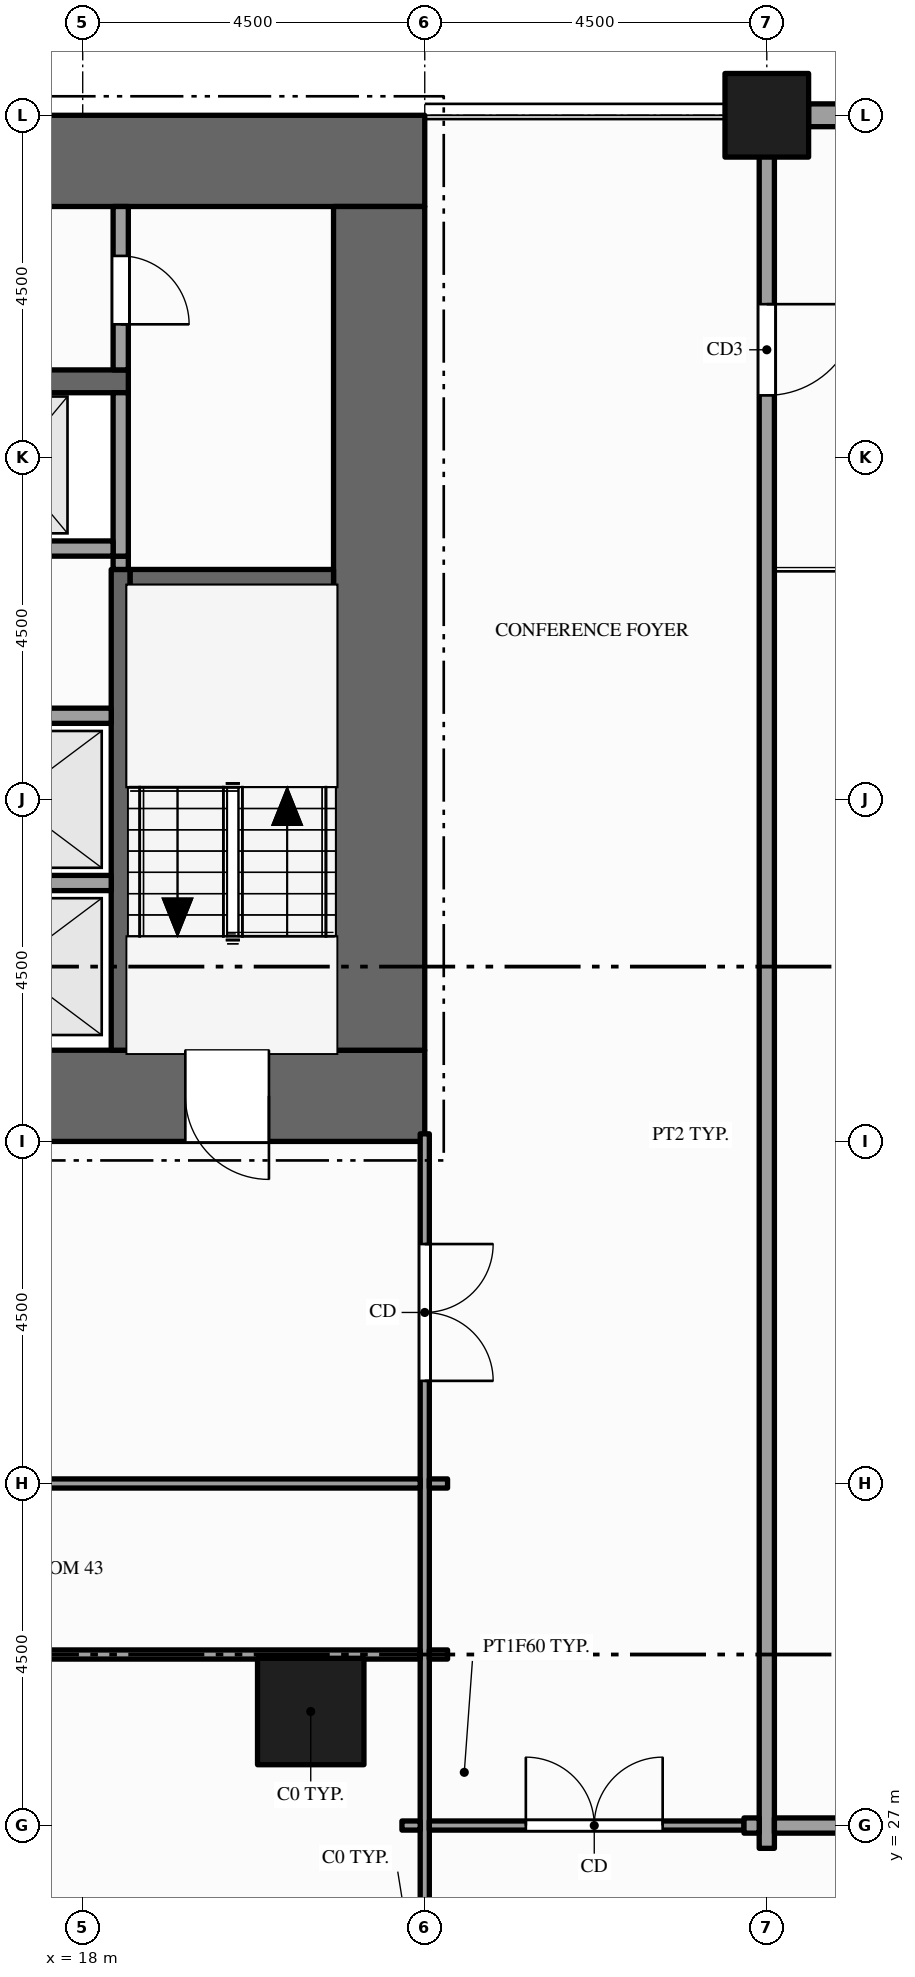
"""IFC4 building model, lengths in metres.
Left out: names, types, materials, properties, quantities, classifications, styles, units other than length and angle.
Written with IfcOpenShell. Run it as: python <this file> out.ifc"""

import sys

from ifc_helpers import new_model, si_unit, direction, frame, frame_2d, origin, origin_2d, place, context, subcontext, project, spatial, rectangle, hollow_rectangle, extrude, element, fill, save


model = new_model("IFC4")
c1 = context("Model", 3, precision=1e-05, world=origin(), true_north=direction((0.0, 1.0)))
c2 = subcontext(c1, "Body", "Model", "MODEL_VIEW")
j1 = project(units=[si_unit("LENGTHUNIT", "METRE"), si_unit("PLANEANGLEUNIT", "RADIAN")], contexts=[c1])
p1 = place(None, origin())
s1 = spatial("IfcSite", under=j1, at=p1, CompositionType="ELEMENT")
p2 = place(p1, origin())
s2 = spatial("IfcBuilding", under=s1, at=p2, CompositionType="ELEMENT")
p3 = place(p2, frame((0.0, 0.0, 14.0)))
s3 = spatial("IfcBuildingStorey", under=s2, at=p3, CompositionType="ELEMENT", Elevation=14.0)
p4 = place(p3, frame((0.0, 36.6, -0.15), z_axis=(0.0, 0.0, 1.0), x_axis=(1.0, 0.0, 0.0)))
e1 = element("IfcWall", 1, at=p4, inside=s3, PredefinedType="SHEAR", context=c2, shape_type="SweptSolid", body=[
    extrude(rectangle(XDim=22.5, YDim=1.2, at=frame_2d((11.25, 0.0))), origin(), (0.0, 0.0, 1.0), 5.0),
])
p5 = place(p4, frame((7.1, 0.0, 0.15)))
e2 = element("IfcOpeningElement", 2, at=p5, cuts=e1, PredefinedType="OPENING", context=c2, shape_type="SweptSolid", body=[
    extrude(rectangle(XDim=1.8, YDim=2.1, at=frame_2d((0.9, 1.05))), frame((0.0, 0.61, 0.0), z_axis=(0.0, -1.0, 0.0), x_axis=(1.0, 0.0, 0.0)), (0.0, 0.0, 1.0), 1.22),
])
p6 = place(p4, frame((13.15, 0.0, 0.15)))
e3 = element("IfcOpeningElement", 3, at=p6, cuts=e1, PredefinedType="OPENING", context=c2, shape_type="SweptSolid", body=[
    extrude(rectangle(XDim=1.1, YDim=2.1, at=frame_2d((0.55, 1.05))), frame((0.0, 0.61, 0.0), z_axis=(0.0, -1.0, 0.0), x_axis=(1.0, 0.0, 0.0)), (0.0, 0.0, 1.0), 1.22),
])
p7 = place(p4, frame((2.15, 0.0, 0.15)))
e4 = element("IfcOpeningElement", 4, at=p7, cuts=e1, PredefinedType="OPENING", context=c2, shape_type="SweptSolid", body=[
    extrude(rectangle(XDim=1.1, YDim=2.1, at=frame_2d((0.55, 1.05))), frame((0.0, 0.61, 0.0), z_axis=(0.0, -1.0, 0.0), x_axis=(1.0, 0.0, 0.0)), (0.0, 0.0, 1.0), 1.22),
])
p8 = place(p4, frame((19.35, 0.0, 0.15)))
e5 = element("IfcOpeningElement", 5, at=p8, cuts=e1, PredefinedType="OPENING", context=c2, shape_type="SweptSolid", body=[
    extrude(rectangle(XDim=1.1, YDim=2.1, at=frame_2d((0.55, 1.05))), frame((0.0, 0.61, 0.0), z_axis=(0.0, -1.0, 0.0), x_axis=(1.0, 0.0, 0.0)), (0.0, 0.0, 1.0), 1.22),
])
p9 = place(p3, frame((0.0, 48.9, -0.15), z_axis=(0.0, 0.0, 1.0), x_axis=(1.0, 0.0, 0.0)))
e6 = element("IfcWall", 6, at=p9, inside=s3, PredefinedType="SHEAR", context=c2, shape_type="SweptSolid", body=[
    extrude(rectangle(XDim=22.5, YDim=1.2, at=frame_2d((11.25, 0.0))), origin(), (0.0, 0.0, 1.0), 5.0),
])
p10 = place(p3, frame((21.9, 37.2, -0.15), z_axis=(0.0, 0.0, 1.0), x_axis=(0.0, 1.0, 0.0)))
e7 = element("IfcWall", 7, at=p10, inside=s3, PredefinedType="SHEAR", context=c2, shape_type="SweptSolid", body=[
    extrude(rectangle(XDim=11.1, YDim=1.2, at=frame_2d((5.55, 0.0))), origin(), (0.0, 0.0, 1.0), 5.0),
])
p11 = place(p3, frame((21.0, 28.5, -0.25), z_axis=(0.0, 0.0, 1.0), x_axis=(1.0, 0.0, 0.0)))
e8 = element("IfcColumn", 8, at=p11, inside=s3, PredefinedType="COLUMN", context=c2, shape_type="SweptSolid", body=[
    extrude(hollow_rectangle(XDim=1.4, YDim=1.4, WallThickness=0.08, at=origin_2d()), origin(), (0.0, 0.0, 1.0), 5.0),
])
p12 = place(p3, frame((27.0, 49.5, -0.25), z_axis=(0.0, 0.0, 1.0), x_axis=(1.0, 0.0, 0.0)))
e9 = element("IfcColumn", 9, at=p12, inside=s3, PredefinedType="COLUMN", context=c2, shape_type="SweptSolid", body=[
    extrude(hollow_rectangle(XDim=1.1, YDim=1.1, WallThickness=0.06, at=origin_2d()), origin(), (0.0, 0.0, 1.0), 5.0),
])
p13 = place(p3, frame((30.95, 49.5, 0.0), z_axis=(0.0, 0.0, 1.0), x_axis=(-1.0, 0.0, 0.0)))
e10 = element("IfcWall", 10, at=p13, inside=s3, PredefinedType="STANDARD", context=c2, shape_type="SweptSolid", body=[
    extrude(rectangle(XDim=3.4, YDim=0.3, at=frame_2d((1.7, 0.0))), origin(), (0.0, 0.0, 1.0), 4.036),
])
p14 = place(p13, frame((0.4, 0.0, 0.9)))
e11 = element("IfcOpeningElement", 11, at=p14, cuts=e10, PredefinedType="OPENING", context=c2, shape_type="SweptSolid", body=[
    extrude(rectangle(XDim=1.0, YDim=2.75, at=frame_2d((0.5, 1.375))), frame((0.0, 0.16, 0.0), z_axis=(0.0, -1.0, 0.0), x_axis=(1.0, 0.0, 0.0)), (0.0, 0.0, 1.0), 0.32),
])
p15 = place(p13, frame((2.0, 0.0, 0.9)))
e12 = element("IfcOpeningElement", 12, at=p15, cuts=e10, PredefinedType="OPENING", context=c2, shape_type="SweptSolid", body=[
    extrude(rectangle(XDim=1.0, YDim=2.75, at=frame_2d((0.5, 1.375))), frame((0.0, 0.16, 0.0), z_axis=(0.0, -1.0, 0.0), x_axis=(1.0, 0.0, 0.0)), (0.0, 0.0, 1.0), 0.32),
])
p16 = place(p3, frame((18.5, 37.2, 0.0), z_axis=(0.0, 0.0, 1.0), x_axis=(0.0, 1.0, 0.0)))
e13 = element("IfcWall", 13, at=p16, inside=s3, PredefinedType="SHEAR", context=c2, shape_type="SweptSolid", body=[
    extrude(rectangle(XDim=6.325, YDim=0.25, at=frame_2d((3.163, 0.0))), origin(), (0.0, 0.0, 1.0), 4.75),
])
p17 = place(p3, frame((18.5, 43.525, 0.0), z_axis=(0.0, 0.0, 1.0), x_axis=(0.0, 1.0, 0.0)))
e14 = element("IfcWall", 14, at=p17, inside=s3, PredefinedType="PARTITIONING", context=c2, shape_type="SweptSolid", body=[
    extrude(rectangle(XDim=0.175, YDim=0.2, at=frame_2d((0.087, 0.0))), origin(), (0.0, 0.0, 1.0), 4.75),
])
p18 = place(p3, frame((18.5, 43.7, 0.0), z_axis=(0.0, 0.0, 1.0), x_axis=(0.0, 1.0, 0.0)))
e15 = element("IfcWall", 15, at=p18, inside=s3, PredefinedType="SOLIDWALL", context=c2, shape_type="SweptSolid", body=[
    extrude(rectangle(XDim=2.15, YDim=0.2, at=frame_2d((1.075, 0.0))), origin(), (0.0, 0.0, 1.0), 4.75),
])
p19 = place(p3, frame((18.5, 46.15, 0.0), z_axis=(0.0, 0.0, 1.0), x_axis=(0.0, 1.0, 0.0)))
e16 = element("IfcWall", 16, at=p19, inside=s3, PredefinedType="PARTITIONING", context=c2, shape_type="SweptSolid", body=[
    extrude(rectangle(XDim=2.15, YDim=0.2, at=frame_2d((1.075, 0.0))), origin(), (0.0, 0.0, 1.0), 4.75),
])
p20 = place(p19, frame((0.6, 0.0, 0.0)))
e17 = element("IfcOpeningElement", 17, at=p20, cuts=e16, PredefinedType="OPENING", context=c2, shape_type="SweptSolid", body=[
    extrude(rectangle(XDim=0.9, YDim=2.1, at=frame_2d((0.45, 1.05))), frame((0.0, 0.11, 0.0), z_axis=(0.0, -1.0, 0.0), x_axis=(1.0, 0.0, 0.0)), (0.0, 0.0, 1.0), 0.22),
])
p21 = place(p3, frame((22.5, 0.15, 0.0), z_axis=(0.0, 0.0, 1.0), x_axis=(0.0, 1.0, 0.0)))
e18 = element("IfcWall", 18, at=p21, inside=s3, PredefinedType="PARTITIONING", context=c2, shape_type="SweptSolid", body=[
    extrude(rectangle(XDim=35.95, YDim=0.12, at=frame_2d((17.975, 0.0))), origin(), (0.0, 0.0, 1.0), 3.759),
])
p22 = place(p21, frame((9.225, 0.0, 0.0)))
e19 = element("IfcOpeningElement", 19, at=p22, cuts=e18, PredefinedType="OPENING", context=c2, shape_type="SweptSolid", body=[
    extrude(rectangle(XDim=1.5, YDim=2.1, at=frame_2d((0.75, 1.05))), frame((0.0, 0.07, 0.0), z_axis=(0.0, -1.0, 0.0), x_axis=(1.0, 0.0, 0.0)), (0.0, 0.0, 1.0), 0.14),
])
p23 = place(p21, frame((32.7, 0.0, 0.0)))
e20 = element("IfcOpeningElement", 20, at=p23, cuts=e18, PredefinedType="OPENING", context=c2, shape_type="SweptSolid", body=[
    extrude(rectangle(XDim=1.8, YDim=2.1, at=frame_2d((0.9, 1.05))), frame((0.0, 0.07, 0.0), z_axis=(0.0, -1.0, 0.0), x_axis=(1.0, 0.0, 0.0)), (0.0, 0.0, 1.0), 0.14),
])
p24 = place(p3, frame((27.0, 26.7, 0.0), z_axis=(0.0, 0.0, 1.0), x_axis=(0.0, 1.0, 0.0)))
e21 = element("IfcWall", 21, at=p24, inside=s3, PredefinedType="PARTITIONING", context=c2, shape_type="SweptSolid", body=[
    extrude(rectangle(XDim=22.65, YDim=0.2, at=frame_2d((11.325, 0.0))), origin(), (0.0, 0.0, 1.0), 3.66),
])
p25 = place(p24, frame((19.115, 0.0, 0.0)))
e22 = element("IfcOpeningElement", 22, at=p25, cuts=e21, PredefinedType="OPENING", context=c2, shape_type="SweptSolid", body=[
    extrude(rectangle(XDim=1.2, YDim=2.1, at=frame_2d((0.6, 1.05))), frame((0.0, 0.11, 0.0), z_axis=(0.0, -1.0, 0.0), x_axis=(1.0, 0.0, 0.0)), (0.0, 0.0, 1.0), 0.22),
])
p26 = place(p3, frame((22.2, 27.0, 0.0), z_axis=(0.0, 0.0, 1.0), x_axis=(1.0, 0.0, 0.0)))
e23 = element("IfcWall", 23, at=p26, inside=s3, PredefinedType="PARTITIONING", context=c2, shape_type="SweptSolid", body=[
    extrude(rectangle(XDim=0.24, YDim=0.12, at=frame_2d((0.12, 0.0))), origin(), (0.0, 0.0, 1.0), 3.759),
])
p27 = place(p3, frame((22.56, 27.0, 0.0), z_axis=(0.0, 0.0, 1.0), x_axis=(1.0, 0.0, 0.0)))
e24 = element("IfcWall", 24, at=p27, inside=s3, PredefinedType="PARTITIONING", context=c2, shape_type="SweptSolid", body=[
    extrude(rectangle(XDim=4.14, YDim=0.12, at=frame_2d((2.07, 0.0))), origin(), (0.0, 0.0, 1.0), 3.66),
])
p28 = place(p27, frame((1.27, 0.0, 0.0)))
e25 = element("IfcOpeningElement", 25, at=p28, cuts=e24, PredefinedType="OPENING", context=c2, shape_type="SweptSolid", body=[
    extrude(rectangle(XDim=1.8, YDim=2.1, at=frame_2d((0.9, 1.05))), frame((0.0, 0.07, 0.0), z_axis=(0.0, -1.0, 0.0), x_axis=(1.0, 0.0, 0.0)), (0.0, 0.0, 1.0), 0.14),
])
p29 = place(p3, frame((26.7, 27.0, 0.0), z_axis=(0.0, 0.0, 1.0), x_axis=(1.0, 0.0, 0.0)))
e26 = element("IfcWall", 26, at=p29, inside=s3, PredefinedType="PARTITIONING", context=c2, shape_type="SweptSolid", body=[
    extrude(rectangle(XDim=0.2, YDim=0.2, at=frame_2d((0.1, 0.0))), origin(), (0.0, 0.0, 1.0), 3.66),
])
p30 = place(p3, frame((27.1, 27.0, 0.0), z_axis=(0.0, 0.0, 1.0), x_axis=(1.0, 0.0, 0.0)))
e27 = element("IfcWall", 27, at=p30, inside=s3, PredefinedType="PARTITIONING", context=c2, shape_type="SweptSolid", body=[
    extrude(rectangle(XDim=26.8, YDim=0.2, at=frame_2d((13.4, 0.0))), origin(), (0.0, 0.0, 1.0), 3.66),
])
p31 = place(p3, frame((11.31, 29.25, 0.0), z_axis=(0.0, 0.0, 1.0), x_axis=(1.0, 0.0, 0.0)))
e28 = element("IfcWall", 28, at=p31, inside=s3, PredefinedType="PARTITIONING", context=c2, shape_type="SweptSolid", body=[
    extrude(rectangle(XDim=11.13, YDim=0.12, at=frame_2d((5.565, 0.0))), origin(), (0.0, 0.0, 1.0), 3.5),
])
p32 = place(p3, frame((22.56, 29.25, 0.0), z_axis=(0.0, 0.0, 1.0), x_axis=(1.0, 0.0, 0.0)))
e29 = element("IfcWall", 29, at=p32, inside=s3, PredefinedType="PARTITIONING", context=c2, shape_type="SweptSolid", body=[
    extrude(rectangle(XDim=0.24, YDim=0.12, at=frame_2d((0.12, 0.0))), origin(), (0.0, 0.0, 1.0), 3.759),
])
p33 = place(p3, frame((11.31, 31.5, 0.0), z_axis=(0.0, 0.0, 1.0), x_axis=(1.0, 0.0, 0.0)))
e30 = element("IfcWall", 30, at=p33, inside=s3, PredefinedType="PARTITIONING", context=c2, shape_type="SweptSolid", body=[
    extrude(rectangle(XDim=11.13, YDim=0.12, at=frame_2d((5.565, 0.0))), origin(), (0.0, 0.0, 1.0), 3.5),
])
p34 = place(p3, frame((22.56, 31.5, 0.0), z_axis=(0.0, 0.0, 1.0), x_axis=(1.0, 0.0, 0.0)))
e31 = element("IfcWall", 31, at=p34, inside=s3, PredefinedType="PARTITIONING", context=c2, shape_type="SweptSolid", body=[
    extrude(rectangle(XDim=0.24, YDim=0.12, at=frame_2d((0.12, 0.0))), origin(), (0.0, 0.0, 1.0), 3.759),
])
for number, where, z_axis, x_axis in (
    (32, (15.7, 39.4, 0.0), (0.0, 0.0, 1.0), (1.0, 0.0, 0.0)),
    (33, (15.7, 41.6, 0.0), (0.0, 0.0, 1.0), (1.0, 0.0, 0.0)),
):
    element("IfcWall", number, at=place(p3, frame(where, z_axis=z_axis, x_axis=x_axis)), inside=s3, PredefinedType="SOLIDWALL", context=c2, shape_type="SweptSolid", body=[
        extrude(rectangle(XDim=2.675, YDim=0.2, at=frame_2d((1.337, 0.0))), origin(), (0.0, 0.0, 1.0), 4.75),
    ])
p35 = place(p3, frame((18.625, 43.4, 0.0), z_axis=(0.0, 0.0, 1.0), x_axis=(1.0, 0.0, 0.0)))
e34 = element("IfcWall", 34, at=p35, inside=s3, PredefinedType="SHEAR", context=c2, shape_type="SweptSolid", body=[
    extrude(rectangle(XDim=2.675, YDim=0.25, at=frame_2d((1.337, 0.0))), origin(), (0.0, 0.0, 1.0), 4.75),
])
p36 = place(p3, frame((15.7, 43.8, 0.0), z_axis=(0.0, 0.0, 1.0), x_axis=(1.0, 0.0, 0.0)))
e35 = element("IfcWall", 35, at=p36, inside=s3, PredefinedType="SOLIDWALL", context=c2, shape_type="SweptSolid", body=[
    extrude(rectangle(XDim=2.7, YDim=0.2, at=frame_2d((1.35, 0.0))), origin(), (0.0, 0.0, 1.0), 4.75),
])
p37 = place(p3, frame((4.1, 46.0, 0.0), z_axis=(0.0, 0.0, 1.0), x_axis=(1.0, 0.0, 0.0)))
e36 = element("IfcWall", 36, at=p37, inside=s3, PredefinedType="SHEAR", context=c2, shape_type="SweptSolid", body=[
    extrude(rectangle(XDim=14.5, YDim=0.3, at=frame_2d((7.25, 0.0))), origin(), (0.0, 0.0, 1.0), 4.75),
])
p38 = place(p37, frame((3.4, 0.0, 0.0)))
e37 = element("IfcOpeningElement", 37, at=p38, cuts=e36, PredefinedType="OPENING", context=c2, shape_type="SweptSolid", body=[
    extrude(rectangle(XDim=1.0, YDim=2.1, at=frame_2d((0.5, 1.05))), frame((0.0, 0.16, 0.0), z_axis=(0.0, -1.0, 0.0), x_axis=(1.0, 0.0, 0.0)), (0.0, 0.0, 1.0), 0.32),
])
p39 = place(p37, frame((9.1, 0.0, 0.0)))
e38 = element("IfcOpeningElement", 38, at=p39, cuts=e36, PredefinedType="OPENING", context=c2, shape_type="SweptSolid", body=[
    extrude(rectangle(XDim=1.0, YDim=2.1, at=frame_2d((0.5, 1.05))), frame((0.0, 0.16, 0.0), z_axis=(0.0, -1.0, 0.0), x_axis=(1.0, 0.0, 0.0)), (0.0, 0.0, 1.0), 0.32),
])
p40 = place(p8, origin())
e39 = element("IfcDoor", 39, at=p40, inside=s3, OperationType="SINGLE_SWING_RIGHT", PredefinedType="DOOR", context=c2, shape_type="SweptSolid", body=[
    extrude(rectangle(XDim=1.1, YDim=2.1, at=frame_2d((0.55, 1.05))), frame((0.0, 0.025, 0.0), z_axis=(0.0, -1.0, 0.0), x_axis=(1.0, 0.0, 0.0)), (0.0, 0.0, 1.0), 0.05),
])
fill(e5, e39)
p41 = place(p20, origin())
e40 = element("IfcDoor", 40, at=p41, inside=s3, OperationType="SINGLE_SWING_LEFT", PredefinedType="DOOR", context=c2, shape_type="SweptSolid", body=[
    extrude(rectangle(XDim=0.9, YDim=2.1, at=frame_2d((0.45, 1.05))), frame((0.0, 0.025, 0.0), z_axis=(0.0, -1.0, 0.0), x_axis=(1.0, 0.0, 0.0)), (0.0, 0.0, 1.0), 0.05),
])
fill(e17, e40)
p42 = place(p28, origin())
e41 = element("IfcDoor", 41, at=p42, inside=s3, OperationType="DOUBLE_DOOR_SINGLE_SWING", PredefinedType="DOOR", context=c2, shape_type="SweptSolid", body=[
    extrude(rectangle(XDim=1.8, YDim=2.1, at=frame_2d((0.9, 1.05))), frame((0.0, 0.025, 0.0), z_axis=(0.0, -1.0, 0.0), x_axis=(1.0, 0.0, 0.0)), (0.0, 0.0, 1.0), 0.05),
])
fill(e25, e41)
p43 = place(p25, origin())
e42 = element("IfcDoor", 42, at=p43, inside=s3, OperationType="SINGLE_SWING_RIGHT", PredefinedType="DOOR", context=c2, shape_type="SweptSolid", body=[
    extrude(rectangle(XDim=1.2, YDim=2.1, at=frame_2d((0.6, 1.05))), frame((0.0, 0.025, 0.0), z_axis=(0.0, -1.0, 0.0), x_axis=(1.0, 0.0, 0.0)), (0.0, 0.0, 1.0), 0.05),
])
fill(e22, e42)
p44 = place(p23, origin())
e43 = element("IfcDoor", 43, at=p44, inside=s3, OperationType="DOUBLE_DOOR_SINGLE_SWING", PredefinedType="DOOR", context=c2, shape_type="SweptSolid", body=[
    extrude(rectangle(XDim=1.8, YDim=2.1, at=frame_2d((0.9, 1.05))), frame((0.0, 0.025, 0.0), z_axis=(0.0, -1.0, 0.0), x_axis=(1.0, 0.0, 0.0)), (0.0, 0.0, 1.0), 0.05),
])
fill(e20, e43)
save(model, sys.argv[1])
